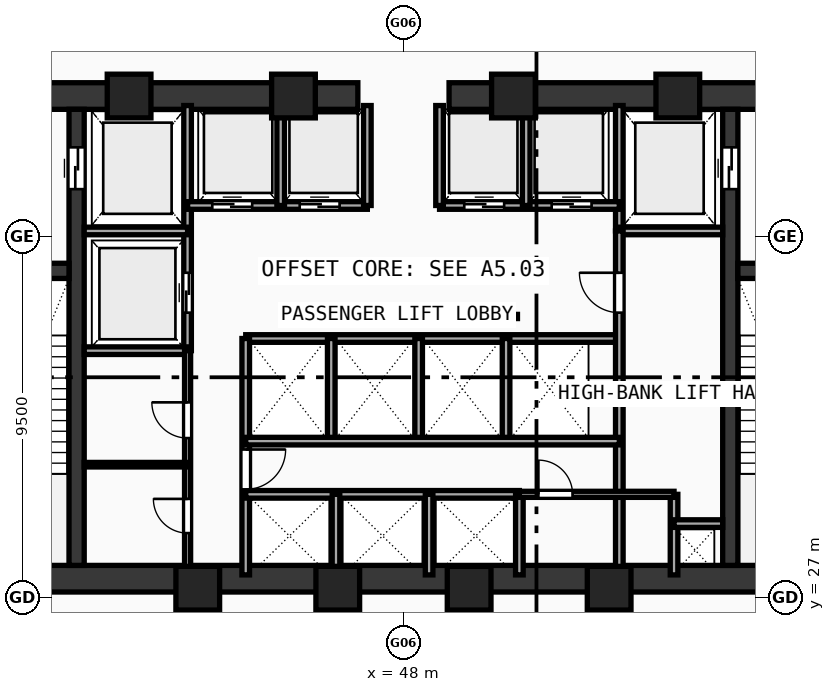
"""IFC4 building model, lengths in metres.
Left out: names, types, materials, properties, quantities, classifications, styles, units other than length and angle.
Written with IfcOpenShell. Run it as: python <this file> out.ifc"""

import sys

from ifc_helpers import new_model, si_unit, direction, frame, frame_2d, origin, origin_with_axes, origin_2d, place, context, subcontext, project, spatial, rectangle, hollow_rectangle, extrude, source, transform, mapped, element, fill, save


model = new_model("IFC4")
c1 = context("Model", 3, precision=1e-05, world=origin(), true_north=direction((0.0, 1.0)))
c2 = subcontext(c1, "Body", "Model", "MODEL_VIEW")
j1 = project(units=[si_unit("LENGTHUNIT", "METRE"), si_unit("PLANEANGLEUNIT", "RADIAN")], contexts=[c1])
p1 = place(None, origin())
s1 = spatial("IfcSite", under=j1, at=p1, CompositionType="ELEMENT")
p2 = place(p1, origin())
s2 = spatial("IfcBuilding", under=s1, at=p2, CompositionType="ELEMENT")
p3 = place(p2, frame((0.0, 0.0, 9.6)))
s3 = spatial("IfcBuildingStorey", under=s2, at=p3, CompositionType="ELEMENT", Elevation=9.6)
p4 = place(p3, frame((35.45, 27.5, 0.0), z_axis=(0.0, 0.0, 1.0), x_axis=(1.0, 0.0, 0.0)))
e1 = element("IfcWall", 1, at=p4, inside=s3, PredefinedType="SHEAR", context=c2, shape_type="SweptSolid", body=[
    extrude(rectangle(XDim=25.1, YDim=0.7, at=frame_2d((12.55, 0.0))), origin(), (0.0, 0.0, 1.0), 4.52),
])
p5 = place(p3, frame((35.45, 40.2, 0.0), z_axis=(0.0, 0.0, 1.0), x_axis=(1.0, 0.0, 0.0)))
e2 = element("IfcWall", 2, at=p5, inside=s3, PredefinedType="SHEAR", context=c2, shape_type="SweptSolid", body=[
    extrude(rectangle(XDim=11.35, YDim=0.7, at=frame_2d((5.675, 0.0))), origin(), (0.0, 0.0, 1.0), 4.52),
])
p6 = place(p5, frame((1.7, 0.0, 0.0)))
e3 = element("IfcOpeningElement", 3, at=p6, cuts=e2, PredefinedType="OPENING", context=c2, shape_type="SweptSolid", body=[
    extrude(rectangle(XDim=1.05, YDim=2.1, at=frame_2d((0.525, 1.05))), frame((0.0, 0.36, 0.0), z_axis=(0.0, -1.0, 0.0), x_axis=(1.0, 0.0, 0.0)), (0.0, 0.0, 1.0), 0.72),
])
p7 = place(p3, frame((49.2, 40.2, 0.0), z_axis=(0.0, 0.0, 1.0), x_axis=(1.0, 0.0, 0.0)))
e4 = element("IfcWall", 4, at=p7, inside=s3, PredefinedType="SHEAR", context=c2, shape_type="SweptSolid", body=[
    extrude(rectangle(XDim=11.35, YDim=0.7, at=frame_2d((5.675, 0.0))), origin(), (0.0, 0.0, 1.0), 4.52),
])
p8 = place(p7, frame((8.6, 0.0, 0.0)))
e5 = element("IfcOpeningElement", 5, at=p8, cuts=e4, PredefinedType="OPENING", context=c2, shape_type="SweptSolid", body=[
    extrude(rectangle(XDim=1.05, YDim=2.1, at=frame_2d((0.525, 1.05))), frame((0.0, 0.36, 0.0), z_axis=(0.0, -1.0, 0.0), x_axis=(1.0, 0.0, 0.0)), (0.0, 0.0, 1.0), 0.72),
])
p9 = place(p3, frame((39.4, 27.85, 0.0), z_axis=(0.0, 0.0, 1.0), x_axis=(0.0, 1.0, 0.0)))
e6 = element("IfcWall", 6, at=p9, inside=s3, PredefinedType="SHEAR", context=c2, shape_type="SweptSolid", body=[
    extrude(rectangle(XDim=12.0, YDim=0.4, at=frame_2d((6.0, 0.0))), origin(), (0.0, 0.0, 1.0), 4.52),
])
p10 = place(p9, frame((9.9, 0.0, 0.0)))
e7 = element("IfcOpeningElement", 7, at=p10, cuts=e6, PredefinedType="OPENING", context=c2, shape_type="SweptSolid", body=[
    extrude(rectangle(XDim=1.1, YDim=2.1, at=frame_2d((0.55, 1.05))), frame((0.0, 0.21, 0.0), z_axis=(0.0, -1.0, 0.0), x_axis=(1.0, 0.0, 0.0)), (0.0, 0.0, 1.0), 0.42),
])
p11 = place(p3, frame((56.6, 27.85, 0.0), z_axis=(0.0, 0.0, 1.0), x_axis=(0.0, 1.0, 0.0)))
e8 = element("IfcWall", 8, at=p11, inside=s3, PredefinedType="SHEAR", context=c2, shape_type="SweptSolid", body=[
    extrude(rectangle(XDim=12.0, YDim=0.4, at=frame_2d((6.0, 0.0))), origin(), (0.0, 0.0, 1.0), 4.52),
])
p12 = place(p11, frame((9.9, 0.0, 0.0)))
e9 = element("IfcOpeningElement", 9, at=p12, cuts=e8, PredefinedType="OPENING", context=c2, shape_type="SweptSolid", body=[
    extrude(rectangle(XDim=1.1, YDim=2.1, at=frame_2d((0.55, 1.05))), frame((0.0, 0.21, 0.0), z_axis=(0.0, -1.0, 0.0), x_axis=(1.0, 0.0, 0.0)), (0.0, 0.0, 1.0), 0.42),
])
p13 = place(p3, frame((36.15, 35.6, 0.0), z_axis=(0.0, 0.0, 1.0), x_axis=(1.0, 0.0, 0.0)))
e10 = element("IfcWall", 10, at=p13, inside=s3, PredefinedType="SHEAR", context=c2, shape_type="SweptSolid", body=[
    extrude(rectangle(XDim=3.05, YDim=0.4, at=frame_2d((1.525, 0.0))), origin(), (0.0, 0.0, 1.0), 4.52),
])
p14 = place(p13, frame((0.97, 0.0, 0.0)))
e11 = element("IfcOpeningElement", 11, at=p14, cuts=e10, PredefinedType="OPENING", context=c2, shape_type="SweptSolid", body=[
    extrude(rectangle(XDim=1.05, YDim=2.1, at=frame_2d((0.525, 1.05))), frame((0.0, 0.21, 0.0), z_axis=(0.0, -1.0, 0.0), x_axis=(1.0, 0.0, 0.0)), (0.0, 0.0, 1.0), 0.42),
])
p15 = place(p3, frame((56.8, 35.6, 0.0), z_axis=(0.0, 0.0, 1.0), x_axis=(1.0, 0.0, 0.0)))
e12 = element("IfcWall", 12, at=p15, inside=s3, PredefinedType="SHEAR", context=c2, shape_type="SweptSolid", body=[
    extrude(rectangle(XDim=3.05, YDim=0.4, at=frame_2d((1.525, 0.0))), origin(), (0.0, 0.0, 1.0), 4.52),
])
p16 = place(p15, frame((1.02, 0.0, 0.0)))
e13 = element("IfcOpeningElement", 13, at=p16, cuts=e12, PredefinedType="OPENING", context=c2, shape_type="SweptSolid", body=[
    extrude(rectangle(XDim=1.05, YDim=2.1, at=frame_2d((0.525, 1.05))), frame((0.0, 0.21, 0.0), z_axis=(0.0, -1.0, 0.0), x_axis=(1.0, 0.0, 0.0)), (0.0, 0.0, 1.0), 0.42),
])
m1 = source(origin(), c2, "Body", "SweptSolid", [
    extrude(hollow_rectangle(XDim=1.15, YDim=1.15, WallThickness=0.048, at=origin_2d()), origin(), (0.0, 0.0, 1.0), 4.8),
])
for number, where, z_axis, x_axis in (
    (14, (42.588, 27.25, -0.28), (0.0, 0.0, 1.0), (1.0, 0.0, 0.0)),
    (15, (46.272, 27.25, -0.28), (0.0, 0.0, 1.0), (1.0, 0.0, 0.0)),
    (16, (49.729, 27.25, -0.28), (0.0, 0.0, 1.0), (1.0, 0.0, 0.0)),
    (17, (53.412, 27.25, -0.28), (0.0, 0.0, 1.0), (1.0, 0.0, 0.0)),
    (18, (55.219, 40.2, -0.28), (0.0, 0.0, 1.0), (1.0, 0.0, 0.0)),
    (19, (50.894, 40.2, -0.28), (0.0, 0.0, 1.0), (1.0, 0.0, 0.0)),
    (20, (45.106, 40.2, -0.28), (0.0, 0.0, 1.0), (1.0, 0.0, 0.0)),
    (21, (40.781, 40.2, -0.28), (0.0, 0.0, 1.0), (1.0, 0.0, 0.0)),
):
    element("IfcColumn", number, at=place(p3, frame(where, z_axis=z_axis, x_axis=x_axis)), inside=s3, PredefinedType="COLUMN", context=c2, shape_type="MappedRepresentation", body=[
        mapped(m1, transform((0.0, 0.0, 0.0), scale=1.0)),
    ])
p17 = place(p3, frame((42.32, 33.5, 0.0), z_axis=(0.0, 0.0, 1.0), x_axis=(0.0, 1.0, 0.0)))
e22 = element("IfcWall", 22, at=p17, inside=s3, PredefinedType="SOLIDWALL", context=c2, shape_type="SweptSolid", body=[
    extrude(rectangle(XDim=6.45, YDim=0.2, at=frame_2d((3.225, 0.0))), origin(), (0.0, 0.0, 1.0), 4.52),
])
p18 = place(p17, frame((1.0, 0.0, 0.0)))
e23 = element("IfcOpeningElement", 23, at=p18, cuts=e22, PredefinedType="OPENING", context=c2, shape_type="SweptSolid", body=[
    extrude(rectangle(XDim=1.05, YDim=2.1, at=frame_2d((0.525, 1.05))), frame((0.0, 0.11, 0.0), z_axis=(0.0, -1.0, 0.0), x_axis=(1.0, 0.0, 0.0)), (0.0, 0.0, 1.0), 0.22),
])
for number, where, z_axis, x_axis in (
    (24, (39.6, 36.65, 0.0), (0.0, 0.0, 1.0), (1.0, 0.0, 0.0)),
    (25, (39.6, 33.5, 0.0), (0.0, 0.0, 1.0), (1.0, 0.0, 0.0)),
):
    element("IfcWall", number, at=place(p3, frame(where, z_axis=z_axis, x_axis=x_axis)), inside=s3, PredefinedType="SOLIDWALL", context=c2, shape_type="SweptSolid", body=[
        extrude(rectangle(XDim=2.72, YDim=0.2, at=frame_2d((1.36, 0.0))), origin(), (0.0, 0.0, 1.0), 4.52),
    ])
p19 = place(p3, frame((53.68, 36.65, 0.0), z_axis=(0.0, 0.0, 1.0), x_axis=(0.0, 1.0, 0.0)))
e26 = element("IfcWall", 26, at=p19, inside=s3, PredefinedType="SOLIDWALL", context=c2, shape_type="SweptSolid", body=[
    extrude(rectangle(XDim=3.3, YDim=0.2, at=frame_2d((1.65, 0.0))), origin(), (0.0, 0.0, 1.0), 4.52),
])
p20 = place(p3, frame((53.68, 36.65, 0.0), z_axis=(0.0, 0.0, 1.0), x_axis=(1.0, 0.0, 0.0)))
e27 = element("IfcWall", 27, at=p20, inside=s3, PredefinedType="SOLIDWALL", context=c2, shape_type="SweptSolid", body=[
    extrude(rectangle(XDim=2.72, YDim=0.2, at=frame_2d((1.36, 0.0))), origin(), (0.0, 0.0, 1.0), 4.52),
])
p21 = place(p3, frame((42.32, 37.32, 0.0), z_axis=(0.0, 0.0, 1.0), x_axis=(1.0, 0.0, 0.0)))
e28 = element("IfcWall", 28, at=p21, inside=s3, PredefinedType="SOLIDWALL", context=c2, shape_type="SweptSolid", body=[
    extrude(rectangle(XDim=4.73, YDim=0.2, at=frame_2d((2.365, 0.0))), origin(), (0.0, 0.0, 1.0), 4.52),
])
p22 = place(p21, frame((0.65, 0.0, 0.0)))
e29 = element("IfcOpeningElement", 29, at=p22, cuts=e28, PredefinedType="OPENING", context=c2, shape_type="SweptSolid", body=[
    extrude(rectangle(XDim=1.05, YDim=2.1, at=frame_2d((0.525, 1.05))), frame((0.0, 0.11, 0.0), z_axis=(0.0, -1.0, 0.0), x_axis=(1.0, 0.0, 0.0)), (0.0, 0.0, 1.0), 0.22),
])
p23 = place(p21, frame((2.95, 0.0, 0.0)))
e30 = element("IfcOpeningElement", 30, at=p23, cuts=e28, PredefinedType="OPENING", context=c2, shape_type="SweptSolid", body=[
    extrude(rectangle(XDim=1.05, YDim=2.1, at=frame_2d((0.525, 1.05))), frame((0.0, 0.11, 0.0), z_axis=(0.0, -1.0, 0.0), x_axis=(1.0, 0.0, 0.0)), (0.0, 0.0, 1.0), 0.22),
])
p24 = place(p3, frame((48.95, 37.32, 0.0), z_axis=(0.0, 0.0, 1.0), x_axis=(1.0, 0.0, 0.0)))
e31 = element("IfcWall", 31, at=p24, inside=s3, PredefinedType="SOLIDWALL", context=c2, shape_type="SweptSolid", body=[
    extrude(rectangle(XDim=4.73, YDim=0.2, at=frame_2d((2.365, 0.0))), origin(), (0.0, 0.0, 1.0), 4.52),
])
p25 = place(p24, frame((0.65, 0.0, 0.0)))
e32 = element("IfcOpeningElement", 32, at=p25, cuts=e31, PredefinedType="OPENING", context=c2, shape_type="SweptSolid", body=[
    extrude(rectangle(XDim=1.05, YDim=2.1, at=frame_2d((0.525, 1.05))), frame((0.0, 0.11, 0.0), z_axis=(0.0, -1.0, 0.0), x_axis=(1.0, 0.0, 0.0)), (0.0, 0.0, 1.0), 0.22),
])
p26 = place(p24, frame((2.95, 0.0, 0.0)))
e33 = element("IfcOpeningElement", 33, at=p26, cuts=e31, PredefinedType="OPENING", context=c2, shape_type="SweptSolid", body=[
    extrude(rectangle(XDim=1.05, YDim=2.1, at=frame_2d((0.525, 1.05))), frame((0.0, 0.11, 0.0), z_axis=(0.0, -1.0, 0.0), x_axis=(1.0, 0.0, 0.0)), (0.0, 0.0, 1.0), 0.22),
])
for number, where, z_axis, x_axis in (
    (34, (47.05, 37.32, 0.0), (0.0, 0.0, 1.0), (0.0, 1.0, 0.0)),
    (35, (48.95, 37.32, 0.0), (0.0, 0.0, 1.0), (0.0, 1.0, 0.0)),
    (36, (44.77, 37.32, 0.0), (0.0, 0.0, 1.0), (0.0, 1.0, 0.0)),
    (37, (51.23, 37.32, 0.0), (0.0, 0.0, 1.0), (0.0, 1.0, 0.0)),
):
    element("IfcWall", number, at=place(p3, frame(where, z_axis=z_axis, x_axis=x_axis)), inside=s3, PredefinedType="SOLIDWALL", context=c2, shape_type="SweptSolid", body=[
        extrude(rectangle(XDim=2.63, YDim=0.2, at=frame_2d((1.315, 0.0))), origin(), (0.0, 0.0, 1.0), 4.52),
    ])
p27 = place(p3, frame((43.85, 33.82, 0.0), z_axis=(0.0, 0.0, 1.0), x_axis=(1.0, 0.0, 0.0)))
e38 = element("IfcWall", 38, at=p27, inside=s3, PredefinedType="SOLIDWALL", context=c2, shape_type="SweptSolid", body=[
    extrude(rectangle(XDim=9.83, YDim=0.2, at=frame_2d((4.915, 0.0))), origin(), (0.0, 0.0, 1.0), 4.52),
])
p28 = place(p3, frame((43.85, 27.6, 0.0), z_axis=(0.0, 0.0, 1.0), x_axis=(0.0, 1.0, 0.0)))
e39 = element("IfcWall", 39, at=p28, inside=s3, PredefinedType="SOLIDWALL", context=c2, shape_type="SweptSolid", body=[
    extrude(rectangle(XDim=6.22, YDim=0.2, at=frame_2d((3.11, 0.0))), origin(), (0.0, 0.0, 1.0), 4.52),
])
p29 = place(p28, frame((2.25, 0.0, 0.0)))
e40 = element("IfcOpeningElement", 40, at=p29, cuts=e39, PredefinedType="OPENING", context=c2, shape_type="SweptSolid", body=[
    extrude(rectangle(XDim=1.05, YDim=2.1, at=frame_2d((0.525, 1.05))), frame((0.0, 0.11, 0.0), z_axis=(0.0, -1.0, 0.0), x_axis=(1.0, 0.0, 0.0)), (0.0, 0.0, 1.0), 0.22),
])
p30 = place(p3, frame((53.68, 27.6, 0.0), z_axis=(0.0, 0.0, 1.0), x_axis=(0.0, 1.0, 0.0)))
e41 = element("IfcWall", 41, at=p30, inside=s3, PredefinedType="SOLIDWALL", context=c2, shape_type="SweptSolid", body=[
    extrude(rectangle(XDim=9.05, YDim=0.2, at=frame_2d((4.525, 0.0))), origin(), (0.0, 0.0, 1.0), 4.52),
])
p31 = place(p30, frame((6.9, 0.0, 0.0)))
e42 = element("IfcOpeningElement", 42, at=p31, cuts=e41, PredefinedType="OPENING", context=c2, shape_type="SweptSolid", body=[
    extrude(rectangle(XDim=1.05, YDim=2.1, at=frame_2d((0.525, 1.05))), frame((0.0, 0.11, 0.0), z_axis=(0.0, -1.0, 0.0), x_axis=(1.0, 0.0, 0.0)), (0.0, 0.0, 1.0), 0.22),
])
for number, where, z_axis, x_axis in (
    (43, (46.1, 31.12, 0.0), (0.0, 0.0, 1.0), (0.0, 1.0, 0.0)),
    (44, (48.4, 31.12, 0.0), (0.0, 0.0, 1.0), (0.0, 1.0, 0.0)),
    (45, (50.7, 31.12, 0.0), (0.0, 0.0, 1.0), (0.0, 1.0, 0.0)),
):
    element("IfcWall", number, at=place(p3, frame(where, z_axis=z_axis, x_axis=x_axis)), inside=s3, PredefinedType="SOLIDWALL", context=c2, shape_type="SweptSolid", body=[
        extrude(rectangle(XDim=2.7, YDim=0.2, at=frame_2d((1.35, 0.0))), origin(), (0.0, 0.0, 1.0), 4.52),
    ])
p32 = place(p3, frame((43.85, 29.72, 0.0), z_axis=(0.0, 0.0, 1.0), x_axis=(1.0, 0.0, 0.0)))
e46 = element("IfcWall", 46, at=p32, inside=s3, PredefinedType="SOLIDWALL", context=c2, shape_type="SweptSolid", body=[
    extrude(rectangle(XDim=7.2, YDim=0.2, at=frame_2d((3.6, 0.0))), origin(), (0.0, 0.0, 1.0), 4.52),
])
p33 = place(p3, frame((51.05, 27.6, 0.0), z_axis=(0.0, 0.0, 1.0), x_axis=(0.0, 1.0, 0.0)))
e47 = element("IfcWall", 47, at=p33, inside=s3, PredefinedType="SOLIDWALL", context=c2, shape_type="SweptSolid", body=[
    extrude(rectangle(XDim=2.12, YDim=0.2, at=frame_2d((1.06, 0.0))), origin(), (0.0, 0.0, 1.0), 4.52),
])
p34 = place(p3, frame((43.85, 31.12, 0.0), z_axis=(0.0, 0.0, 1.0), x_axis=(1.0, 0.0, 0.0)))
e48 = element("IfcWall", 48, at=p34, inside=s3, PredefinedType="SOLIDWALL", context=c2, shape_type="SweptSolid", body=[
    extrude(rectangle(XDim=9.83, YDim=0.2, at=frame_2d((4.915, 0.0))), origin(), (0.0, 0.0, 1.0), 4.52),
])
for number, where, z_axis, x_axis in (
    (49, (46.225, 27.6, 0.0), (0.0, 0.0, 1.0), (0.0, 1.0, 0.0)),
    (50, (48.675, 27.6, 0.0), (0.0, 0.0, 1.0), (0.0, 1.0, 0.0)),
    (51, (55.12, 27.6, 0.0), (0.0, 0.0, 1.0), (0.0, 1.0, 0.0)),
):
    element("IfcWall", number, at=place(p3, frame(where, z_axis=z_axis, x_axis=x_axis)), inside=s3, PredefinedType="SOLIDWALL", context=c2, shape_type="SweptSolid", body=[
        extrude(rectangle(XDim=2.12, YDim=0.2, at=frame_2d((1.06, 0.0))), origin(), (0.0, 0.0, 1.0), 4.52),
    ])
p35 = place(p3, frame((55.12, 28.95, 0.0), z_axis=(0.0, 0.0, 1.0), x_axis=(1.0, 0.0, 0.0)))
e52 = element("IfcWall", 52, at=p35, inside=s3, PredefinedType="SOLIDWALL", context=c2, shape_type="SweptSolid", body=[
    extrude(rectangle(XDim=1.28, YDim=0.2, at=frame_2d((0.64, 0.0))), origin(), (0.0, 0.0, 1.0), 4.52),
])
p36 = place(p3, frame((42.32, 27.6, 0.0), z_axis=(0.0, 0.0, 1.0), x_axis=(0.0, 1.0, 0.0)))
e53 = element("IfcWall", 53, at=p36, inside=s3, PredefinedType="PARTITIONING", context=c2, shape_type="SweptSolid", body=[
    extrude(rectangle(XDim=5.9, YDim=0.16, at=frame_2d((2.95, 0.0))), origin(), (0.0, 0.0, 1.0), 4.52),
])
p37 = place(p36, frame((1.1, 0.0, 0.0)))
e54 = element("IfcOpeningElement", 54, at=p37, cuts=e53, PredefinedType="OPENING", context=c2, shape_type="SweptSolid", body=[
    extrude(rectangle(XDim=0.9, YDim=2.1, at=frame_2d((0.45, 1.05))), frame((0.0, 0.09, 0.0), z_axis=(0.0, -1.0, 0.0), x_axis=(1.0, 0.0, 0.0)), (0.0, 0.0, 1.0), 0.18),
])
p38 = place(p36, frame((3.6, 0.0, 0.0)))
e55 = element("IfcOpeningElement", 55, at=p38, cuts=e53, PredefinedType="OPENING", context=c2, shape_type="SweptSolid", body=[
    extrude(rectangle(XDim=0.94, YDim=2.1, at=frame_2d((0.47, 1.05))), frame((0.0, 0.09, 0.0), z_axis=(0.0, -1.0, 0.0), x_axis=(1.0, 0.0, 0.0)), (0.0, 0.0, 1.0), 0.18),
])
p39 = place(p3, frame((51.05, 29.72, 0.0), z_axis=(0.0, 0.0, 1.0), x_axis=(1.0, 0.0, 0.0)))
e56 = element("IfcWall", 56, at=p39, inside=s3, PredefinedType="PARTITIONING", context=c2, shape_type="SweptSolid", body=[
    extrude(rectangle(XDim=4.07, YDim=0.16, at=frame_2d((2.035, 0.0))), origin(), (0.0, 0.0, 1.0), 4.52),
])
p40 = place(p39, frame((0.5, 0.0, 0.0)))
e57 = element("IfcOpeningElement", 57, at=p40, cuts=e56, PredefinedType="OPENING", context=c2, shape_type="SweptSolid", body=[
    extrude(rectangle(XDim=0.9, YDim=2.1, at=frame_2d((0.45, 1.05))), frame((0.0, 0.09, 0.0), z_axis=(0.0, -1.0, 0.0), x_axis=(1.0, 0.0, 0.0)), (0.0, 0.0, 1.0), 0.18),
])
p41 = place(p3, frame((39.6, 30.5, 0.0), z_axis=(0.0, 0.0, 1.0), x_axis=(1.0, 0.0, 0.0)))
e58 = element("IfcWall", 58, at=p41, inside=s3, PredefinedType="PARTITIONING", context=c2, shape_type="SweptSolid", body=[
    extrude(rectangle(XDim=2.72, YDim=0.12, at=frame_2d((1.36, 0.0))), origin(), (0.0, 0.0, 1.0), 4.52),
])
p42 = place(p3, frame((45.9, 12.45, 0.0), z_axis=(0.0, 0.0, 1.0), x_axis=(0.0, 1.0, 0.0)))
e59 = element("IfcWall", 59, at=p42, inside=s3, PredefinedType="PARTITIONING", context=c2, shape_type="SweptSolid", body=[
    extrude(rectangle(XDim=15.05, YDim=0.16, at=frame_2d((7.525, 0.0))), origin(), (0.0, 0.0, 1.0), 3.62),
])
p43 = place(p3, frame((45.0, 34.4, 0.0), z_axis=(0.0, 0.0, 1.0), x_axis=(1.0, 0.0, 0.0)))
e60 = element("IfcWall", 60, at=p43, inside=s3, PredefinedType="MOVABLE", context=c2, shape_type="SweptSolid", body=[
    extrude(rectangle(XDim=6.0, YDim=0.11, at=frame_2d((3.0, 0.0))), origin(), (0.0, 0.0, 1.0), 2.5),
])
m2 = source(origin(), c2, "Body", "SweptSolid", [
    extrude(rectangle(XDim=1.1, YDim=2.1, at=frame_2d((0.55, 1.05))), frame((0.0, 0.025, 0.0), z_axis=(0.0, -1.0, 0.0), x_axis=(1.0, 0.0, 0.0)), (0.0, 0.0, 1.0), 0.05),
])
p44 = place(p10, frame((1.1, 0.0, 0.0), z_axis=(0.0, 0.0, 1.0), x_axis=(-1.0, 0.0, 0.0)))
e61 = element("IfcDoor", 61, at=p44, inside=s3, OperationType="DOUBLE_DOOR_SLIDING", PredefinedType="DOOR", context=c2, shape_type="MappedRepresentation", body=[
    mapped(m2, transform((0.0, 0.0, 0.0), scale=1.0)),
])
fill(e7, e61)
p45 = place(p12, origin_with_axes())
e62 = element("IfcDoor", 62, at=p45, inside=s3, OperationType="DOUBLE_DOOR_SLIDING", PredefinedType="DOOR", context=c2, shape_type="MappedRepresentation", body=[
    mapped(m2, transform((0.0, 0.0, 0.0), scale=1.0)),
])
fill(e9, e62)
m3 = source(origin(), c2, "Body", "SweptSolid", [
    extrude(rectangle(XDim=1.05, YDim=2.1, at=frame_2d((0.525, 1.05))), frame((0.0, 0.025, 0.0), z_axis=(0.0, -1.0, 0.0), x_axis=(1.0, 0.0, 0.0)), (0.0, 0.0, 1.0), 0.05),
])
p46 = place(p18, origin_with_axes())
e63 = element("IfcDoor", 63, at=p46, inside=s3, OperationType="DOUBLE_DOOR_SLIDING", PredefinedType="DOOR", context=c2, shape_type="MappedRepresentation", body=[
    mapped(m3, transform((0.0, 0.0, 0.0), scale=1.0)),
])
fill(e23, e63)
p47 = place(p22, frame((1.05, 0.0, 0.0), z_axis=(0.0, 0.0, 1.0), x_axis=(-1.0, 0.0, 0.0)))
e64 = element("IfcDoor", 64, at=p47, inside=s3, OperationType="DOUBLE_DOOR_SLIDING", PredefinedType="DOOR", context=c2, shape_type="MappedRepresentation", body=[
    mapped(m3, transform((0.0, 0.0, 0.0), scale=1.0)),
])
fill(e29, e64)
p48 = place(p23, frame((1.05, 0.0, 0.0), z_axis=(0.0, 0.0, 1.0), x_axis=(-1.0, 0.0, 0.0)))
e65 = element("IfcDoor", 65, at=p48, inside=s3, OperationType="DOUBLE_DOOR_SLIDING", PredefinedType="DOOR", context=c2, shape_type="MappedRepresentation", body=[
    mapped(m3, transform((0.0, 0.0, 0.0), scale=1.0)),
])
fill(e30, e65)
p49 = place(p25, frame((1.05, 0.0, 0.0), z_axis=(0.0, 0.0, 1.0), x_axis=(-1.0, 0.0, 0.0)))
e66 = element("IfcDoor", 66, at=p49, inside=s3, OperationType="DOUBLE_DOOR_SLIDING", PredefinedType="DOOR", context=c2, shape_type="MappedRepresentation", body=[
    mapped(m3, transform((0.0, 0.0, 0.0), scale=1.0)),
])
fill(e32, e66)
p50 = place(p26, frame((1.05, 0.0, 0.0), z_axis=(0.0, 0.0, 1.0), x_axis=(-1.0, 0.0, 0.0)))
e67 = element("IfcDoor", 67, at=p50, inside=s3, OperationType="DOUBLE_DOOR_SLIDING", PredefinedType="DOOR", context=c2, shape_type="MappedRepresentation", body=[
    mapped(m3, transform((0.0, 0.0, 0.0), scale=1.0)),
])
fill(e33, e67)
p51 = place(p29, frame((1.05, 0.0, 0.0), z_axis=(0.0, 0.0, 1.0), x_axis=(-1.0, 0.0, 0.0)))
e68 = element("IfcDoor", 68, at=p51, inside=s3, OperationType="SINGLE_SWING_LEFT", PredefinedType="DOOR", context=c2, shape_type="MappedRepresentation", body=[
    mapped(m3, transform((0.0, 0.0, 0.0), scale=1.0)),
])
fill(e40, e68)
p52 = place(p31, origin_with_axes())
e69 = element("IfcDoor", 69, at=p52, inside=s3, OperationType="SINGLE_SWING_RIGHT", PredefinedType="DOOR", context=c2, shape_type="MappedRepresentation", body=[
    mapped(m3, transform((0.0, 0.0, 0.0), scale=1.0)),
])
fill(e42, e69)
m4 = source(origin(), c2, "Body", "SweptSolid", [
    extrude(rectangle(XDim=0.9, YDim=2.1, at=frame_2d((0.45, 1.05))), frame((0.0, 0.025, 0.0), z_axis=(0.0, -1.0, 0.0), x_axis=(1.0, 0.0, 0.0)), (0.0, 0.0, 1.0), 0.05),
])
p53 = place(p37, origin_with_axes())
e70 = element("IfcDoor", 70, at=p53, inside=s3, OperationType="SINGLE_SWING_RIGHT", PredefinedType="DOOR", context=c2, shape_type="MappedRepresentation", body=[
    mapped(m4, transform((0.0, 0.0, 0.0), scale=1.0)),
])
fill(e54, e70)
m5 = source(origin(), c2, "Body", "SweptSolid", [
    extrude(rectangle(XDim=0.94, YDim=2.1, at=frame_2d((0.47, 1.05))), frame((0.0, 0.025, 0.0), z_axis=(0.0, -1.0, 0.0), x_axis=(1.0, 0.0, 0.0)), (0.0, 0.0, 1.0), 0.05),
])
p54 = place(p38, origin_with_axes())
e71 = element("IfcDoor", 71, at=p54, inside=s3, OperationType="SINGLE_SWING_RIGHT", PredefinedType="DOOR", context=c2, shape_type="MappedRepresentation", body=[
    mapped(m5, transform((0.0, 0.0, 0.0), scale=1.0)),
])
fill(e55, e71)
p55 = place(p40, origin_with_axes())
e72 = element("IfcDoor", 72, at=p55, inside=s3, OperationType="SINGLE_SWING_LEFT", PredefinedType="DOOR", context=c2, shape_type="MappedRepresentation", body=[
    mapped(m4, transform((0.0, 0.0, 0.0), scale=1.0)),
])
fill(e57, e72)
save(model, sys.argv[1])
